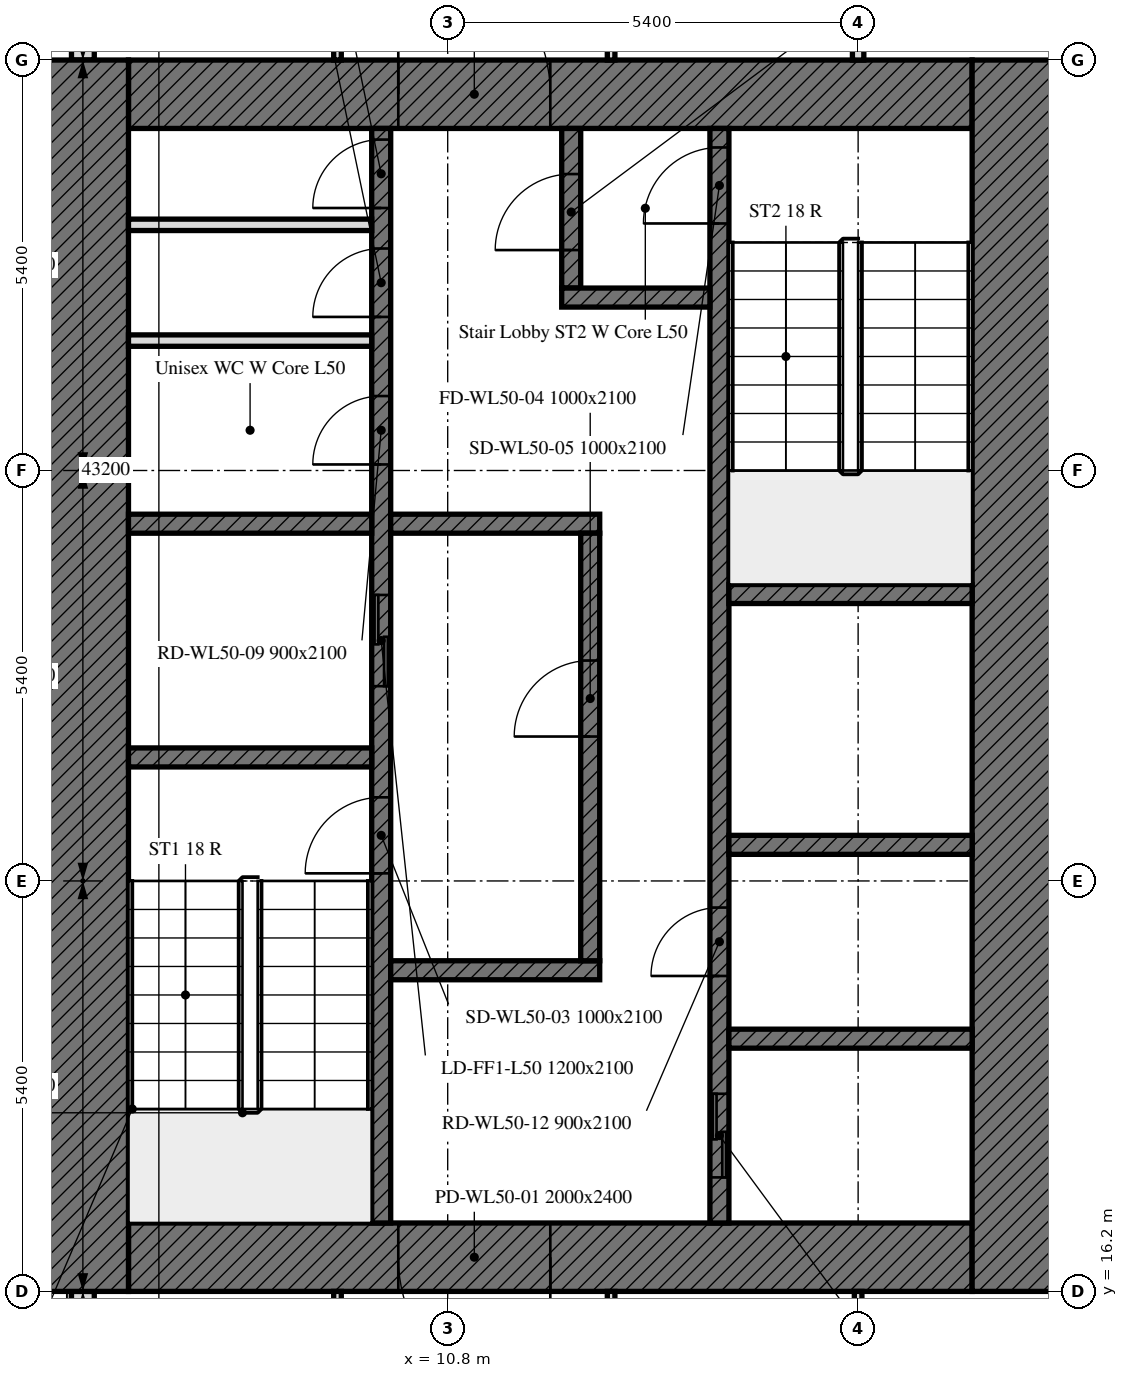
"""IFC4 building model, lengths in metres.
Left out: names, types, materials, properties, quantities, classifications, styles, units other than length and angle.
Written with IfcOpenShell. Run it as: python <this file> out.ifc"""

import sys

from ifc_helpers import new_model, si_unit, direction, frame, frame_2d, origin, place, context, subcontext, project, spatial, rectangle, extrude, element, fill, save


model = new_model("IFC4")
c1 = context("Model", 3, precision=1e-05, world=origin(), true_north=direction((0.0, 1.0)))
c2 = subcontext(c1, "Body", "Model", "MODEL_VIEW")
j1 = project(units=[si_unit("LENGTHUNIT", "METRE"), si_unit("PLANEANGLEUNIT", "RADIAN")], contexts=[c1])
p1 = place(None, origin())
s1 = spatial("IfcSite", under=j1, at=p1, CompositionType="ELEMENT")
p2 = place(p1, origin())
s2 = spatial("IfcBuilding", under=s1, at=p2, CompositionType="ELEMENT")
p3 = place(p2, frame((0.0, 0.0, 203.8)))
s3 = spatial("IfcBuildingStorey", under=s2, at=p3, CompositionType="ELEMENT", Elevation=203.8)
p4 = place(p3, frame((6.0, 43.014, 0.0), z_axis=(0.0, 0.0, 1.0), x_axis=(0.0, -1.0, 0.0)))
e1 = element("IfcWall", 1, at=p4, inside=s3, PredefinedType="SOLIDWALL", context=c2, shape_type="SweptSolid", body=[
    extrude(rectangle(XDim=10.614, YDim=0.3, at=frame_2d((5.307, 0.0))), origin(), (0.0, 0.0, 1.0), 3.0),
])
p5 = place(p4, frame((1.164, 0.0, 0.9)))
e2 = element("IfcOpeningElement", 2, at=p5, cuts=e1, PredefinedType="OPENING", context=c2, shape_type="SweptSolid", body=[
    extrude(rectangle(XDim=1.1, YDim=1.7, at=frame_2d((0.55, 0.85))), frame((0.0, 0.16, 0.0), z_axis=(0.0, -1.0, 0.0), x_axis=(1.0, 0.0, 0.0)), (0.0, 0.0, 1.0), 0.32),
])
p6 = place(p4, frame((2.764, 0.0, 0.9)))
e3 = element("IfcOpeningElement", 3, at=p6, cuts=e1, PredefinedType="OPENING", context=c2, shape_type="SweptSolid", body=[
    extrude(rectangle(XDim=1.1, YDim=1.7, at=frame_2d((0.55, 0.85))), frame((0.0, 0.16, 0.0), z_axis=(0.0, -1.0, 0.0), x_axis=(1.0, 0.0, 0.0)), (0.0, 0.0, 1.0), 0.32),
])
p7 = place(p4, frame((6.214, 0.0, 0.9)))
e4 = element("IfcOpeningElement", 4, at=p7, cuts=e1, PredefinedType="OPENING", context=c2, shape_type="SweptSolid", body=[
    extrude(rectangle(XDim=3.4, YDim=1.7, at=frame_2d((1.7, 0.85))), frame((0.0, 0.16, 0.0), z_axis=(0.0, -1.0, 0.0), x_axis=(1.0, 0.0, 0.0)), (0.0, 0.0, 1.0), 0.32),
])
p8 = place(p3, frame((6.0, 16.2, 0.0), z_axis=(0.0, 0.0, 1.0), x_axis=(0.0, -1.0, 0.0)))
e5 = element("IfcWall", 5, at=p8, inside=s3, PredefinedType="SOLIDWALL", context=c2, shape_type="SweptSolid", body=[
    extrude(rectangle(XDim=5.214, YDim=0.3, at=frame_2d((2.607, 0.0))), origin(), (0.0, 0.0, 1.0), 3.0),
])
p9 = place(p8, frame((1.35, 0.0, 0.9)))
e6 = element("IfcOpeningElement", 6, at=p9, cuts=e5, PredefinedType="OPENING", context=c2, shape_type="SweptSolid", body=[
    extrude(rectangle(XDim=1.1, YDim=1.7, at=frame_2d((0.55, 0.85))), frame((0.0, 0.16, 0.0), z_axis=(0.0, -1.0, 0.0), x_axis=(1.0, 0.0, 0.0)), (0.0, 0.0, 1.0), 0.32),
])
p10 = place(p8, frame((2.95, 0.0, 0.9)))
e7 = element("IfcOpeningElement", 7, at=p10, cuts=e5, PredefinedType="OPENING", context=c2, shape_type="SweptSolid", body=[
    extrude(rectangle(XDim=1.1, YDim=1.7, at=frame_2d((0.55, 0.85))), frame((0.0, 0.16, 0.0), z_axis=(0.0, -1.0, 0.0), x_axis=(1.0, 0.0, 0.0)), (0.0, 0.0, 1.0), 0.32),
])
p11 = place(p3, frame((17.7, 16.65, 0.0), z_axis=(0.0, 0.0, 1.0), x_axis=(-1.0, 0.0, 0.0)))
e8 = element("IfcWall", 8, at=p11, inside=s3, PredefinedType="SOLIDWALL", context=c2, shape_type="SweptSolid", body=[
    extrude(rectangle(XDim=11.1, YDim=0.9, at=frame_2d((5.55, 0.0))), origin(), (0.0, 0.0, 1.0), 3.0),
])
p12 = place(p11, frame((5.55, 0.0, 0.0)))
e9 = element("IfcOpeningElement", 9, at=p12, cuts=e8, PredefinedType="OPENING", context=c2, shape_type="SweptSolid", body=[
    extrude(rectangle(XDim=2.0, YDim=2.4, at=frame_2d((1.0, 1.2))), frame((0.0, 0.45, 0.0), z_axis=(0.0, -1.0, 0.0), x_axis=(1.0, 0.0, 0.0)), (0.0, 0.0, 1.0), 0.9),
])
p13 = place(p3, frame((6.6, 31.95, 0.0), z_axis=(0.0, 0.0, 1.0), x_axis=(1.0, 0.0, 0.0)))
e10 = element("IfcWall", 10, at=p13, inside=s3, PredefinedType="SOLIDWALL", context=c2, shape_type="SweptSolid", body=[
    extrude(rectangle(XDim=11.1, YDim=0.9, at=frame_2d((5.55, 0.0))), origin(), (0.0, 0.0, 1.0), 3.0),
])
p14 = place(p13, frame((3.55, 0.0, 0.0)))
e11 = element("IfcOpeningElement", 11, at=p14, cuts=e10, PredefinedType="OPENING", context=c2, shape_type="SweptSolid", body=[
    extrude(rectangle(XDim=2.0, YDim=2.4, at=frame_2d((1.0, 1.2))), frame((0.0, 0.45, 0.0), z_axis=(0.0, -1.0, 0.0), x_axis=(1.0, 0.0, 0.0)), (0.0, 0.0, 1.0), 0.9),
])
for number, where, z_axis, x_axis in (
    (12, (6.0, 16.2, 0.0), (0.0, 0.0, 1.0), (0.0, 1.0, 0.0)),
    (13, (18.3, 32.4, 0.0), (0.0, 0.0, 1.0), (0.0, -1.0, 0.0)),
):
    element("IfcWall", number, at=place(p3, frame(where, z_axis=z_axis, x_axis=x_axis)), inside=s3, PredefinedType="SOLIDWALL", context=c2, shape_type="SweptSolid", body=[
        extrude(rectangle(XDim=16.2, YDim=1.2, at=frame_2d((8.1, 0.0))), origin(), (0.0, 0.0, 1.0), 3.0),
    ])
p15 = place(p3, frame((9.925, 17.1, 0.0), z_axis=(0.0, 0.0, 1.0), x_axis=(0.0, 1.0, 0.0)))
e14 = element("IfcWall", 14, at=p15, inside=s3, PredefinedType="SOLIDWALL", context=c2, shape_type="SweptSolid", body=[
    extrude(rectangle(XDim=14.4, YDim=0.25, at=frame_2d((7.2, 0.0))), origin(), (0.0, 0.0, 1.0), 3.0),
])
p16 = place(p15, frame((4.6, 0.0, 0.0)))
e15 = element("IfcOpeningElement", 15, at=p16, cuts=e14, PredefinedType="OPENING", context=c2, shape_type="SweptSolid", body=[
    extrude(rectangle(XDim=1.0, YDim=2.1, at=frame_2d((0.5, 1.05))), frame((0.0, 0.125, 0.0), z_axis=(0.0, -1.0, 0.0), x_axis=(1.0, 0.0, 0.0)), (0.0, 0.0, 1.0), 0.25),
])
p17 = place(p15, frame((7.062, 0.0, 0.0)))
e16 = element("IfcOpeningElement", 16, at=p17, cuts=e14, PredefinedType="OPENING", context=c2, shape_type="SweptSolid", body=[
    extrude(rectangle(XDim=1.2, YDim=2.1, at=frame_2d((0.6, 1.05))), frame((0.0, 0.125, 0.0), z_axis=(0.0, -1.0, 0.0), x_axis=(1.0, 0.0, 0.0)), (0.0, 0.0, 1.0), 0.25),
])
p18 = place(p15, frame((9.979, 0.0, 0.0)))
e17 = element("IfcOpeningElement", 17, at=p18, cuts=e14, PredefinedType="OPENING", context=c2, shape_type="SweptSolid", body=[
    extrude(rectangle(XDim=0.9, YDim=2.1, at=frame_2d((0.45, 1.05))), frame((0.0, 0.125, 0.0), z_axis=(0.0, -1.0, 0.0), x_axis=(1.0, 0.0, 0.0)), (0.0, 0.0, 1.0), 0.25),
])
p19 = place(p15, frame((11.92, 0.0, 0.0)))
e18 = element("IfcOpeningElement", 18, at=p19, cuts=e14, PredefinedType="OPENING", context=c2, shape_type="SweptSolid", body=[
    extrude(rectangle(XDim=0.9, YDim=2.1, at=frame_2d((0.45, 1.05))), frame((0.0, 0.125, 0.0), z_axis=(0.0, -1.0, 0.0), x_axis=(1.0, 0.0, 0.0)), (0.0, 0.0, 1.0), 0.25),
])
p20 = place(p15, frame((13.354, 0.0, 0.0)))
e19 = element("IfcOpeningElement", 19, at=p20, cuts=e14, PredefinedType="OPENING", context=c2, shape_type="SweptSolid", body=[
    extrude(rectangle(XDim=0.9, YDim=2.1, at=frame_2d((0.45, 1.05))), frame((0.0, 0.125, 0.0), z_axis=(0.0, -1.0, 0.0), x_axis=(1.0, 0.0, 0.0)), (0.0, 0.0, 1.0), 0.25),
])
p21 = place(p3, frame((14.375, 17.1, 0.0), z_axis=(0.0, 0.0, 1.0), x_axis=(0.0, 1.0, 0.0)))
e20 = element("IfcWall", 20, at=p21, inside=s3, PredefinedType="SOLIDWALL", context=c2, shape_type="SweptSolid", body=[
    extrude(rectangle(XDim=14.4, YDim=0.25, at=frame_2d((7.2, 0.0))), origin(), (0.0, 0.0, 1.0), 3.0),
])
p22 = place(p21, frame((13.15, 0.0, 0.0)))
e21 = element("IfcOpeningElement", 21, at=p22, cuts=e20, PredefinedType="OPENING", context=c2, shape_type="SweptSolid", body=[
    extrude(rectangle(XDim=1.0, YDim=2.1, at=frame_2d((0.5, 1.05))), frame((0.0, 0.125, 0.0), z_axis=(0.0, -1.0, 0.0), x_axis=(1.0, 0.0, 0.0)), (0.0, 0.0, 1.0), 0.25),
])
p23 = place(p21, frame((0.6, 0.0, 0.0)))
e22 = element("IfcOpeningElement", 22, at=p23, cuts=e20, PredefinedType="OPENING", context=c2, shape_type="SweptSolid", body=[
    extrude(rectangle(XDim=1.1, YDim=2.1, at=frame_2d((0.55, 1.05))), frame((0.0, 0.125, 0.0), z_axis=(0.0, -1.0, 0.0), x_axis=(1.0, 0.0, 0.0)), (0.0, 0.0, 1.0), 0.25),
])
p24 = place(p21, frame((3.25, 0.0, 0.0)))
e23 = element("IfcOpeningElement", 23, at=p24, cuts=e20, PredefinedType="OPENING", context=c2, shape_type="SweptSolid", body=[
    extrude(rectangle(XDim=0.9, YDim=2.1, at=frame_2d((0.45, 1.05))), frame((0.0, 0.125, 0.0), z_axis=(0.0, -1.0, 0.0), x_axis=(1.0, 0.0, 0.0)), (0.0, 0.0, 1.0), 0.25),
])
for number, where, z_axis, x_axis in (
    (24, (6.6, 23.225, 0.0), (0.0, 0.0, 1.0), (1.0, 0.0, 0.0)),
    (25, (14.5, 25.375, 0.0), (0.0, 0.0, 1.0), (1.0, 0.0, 0.0)),
    (26, (14.5, 22.075, 0.0), (0.0, 0.0, 1.0), (1.0, 0.0, 0.0)),
    (27, (6.6, 26.3, 0.0), (0.0, 0.0, 1.0), (1.0, 0.0, 0.0)),
):
    element("IfcWall", number, at=place(p3, frame(where, z_axis=z_axis, x_axis=x_axis)), inside=s3, PredefinedType="SOLIDWALL", context=c2, shape_type="SweptSolid", body=[
        extrude(rectangle(XDim=3.2, YDim=0.25, at=frame_2d((1.6, 0.0))), origin(), (0.0, 0.0, 1.0), 3.0),
    ])
for number, where, z_axis, x_axis in (
    (28, (10.05, 26.3, 0.0), (0.0, 0.0, 1.0), (1.0, 0.0, 0.0)),
    (29, (10.05, 20.425, 0.0), (0.0, 0.0, 1.0), (1.0, 0.0, 0.0)),
):
    element("IfcWall", number, at=place(p3, frame(where, z_axis=z_axis, x_axis=x_axis)), inside=s3, PredefinedType="SOLIDWALL", context=c2, shape_type="SweptSolid", body=[
        extrude(rectangle(XDim=2.75, YDim=0.25, at=frame_2d((1.375, 0.0))), origin(), (0.0, 0.0, 1.0), 3.0),
    ])
p25 = place(p3, frame((12.425, 29.4, 0.0), z_axis=(0.0, 0.0, 1.0), x_axis=(0.0, 1.0, 0.0)))
e30 = element("IfcWall", 30, at=p25, inside=s3, PredefinedType="SOLIDWALL", context=c2, shape_type="SweptSolid", body=[
    extrude(rectangle(XDim=2.1, YDim=0.25, at=frame_2d((1.05, 0.0))), origin(), (0.0, 0.0, 1.0), 3.0),
])
p26 = place(p25, frame((0.5, 0.0, 0.0)))
e31 = element("IfcOpeningElement", 31, at=p26, cuts=e30, PredefinedType="OPENING", context=c2, shape_type="SweptSolid", body=[
    extrude(rectangle(XDim=1.0, YDim=2.1, at=frame_2d((0.5, 1.05))), frame((0.0, 0.125, 0.0), z_axis=(0.0, -1.0, 0.0), x_axis=(1.0, 0.0, 0.0)), (0.0, 0.0, 1.0), 0.25),
])
p27 = place(p3, frame((12.3, 29.275, 0.0), z_axis=(0.0, 0.0, 1.0), x_axis=(1.0, 0.0, 0.0)))
e32 = element("IfcWall", 32, at=p27, inside=s3, PredefinedType="SOLIDWALL", context=c2, shape_type="SweptSolid", body=[
    extrude(rectangle(XDim=1.95, YDim=0.25, at=frame_2d((0.975, 0.0))), origin(), (0.0, 0.0, 1.0), 3.0),
])
p28 = place(p3, frame((12.675, 20.55, 0.0), z_axis=(0.0, 0.0, 1.0), x_axis=(0.0, 1.0, 0.0)))
e33 = element("IfcWall", 33, at=p28, inside=s3, PredefinedType="SOLIDWALL", context=c2, shape_type="SweptSolid", body=[
    extrude(rectangle(XDim=5.625, YDim=0.25, at=frame_2d((2.812, 0.0))), origin(), (0.0, 0.0, 1.0), 3.0),
])
p29 = place(p28, frame((2.95, 0.0, 0.0)))
e34 = element("IfcOpeningElement", 34, at=p29, cuts=e33, PredefinedType="OPENING", context=c2, shape_type="SweptSolid", body=[
    extrude(rectangle(XDim=1.0, YDim=2.1, at=frame_2d((0.5, 1.05))), frame((0.0, 0.125, 0.0), z_axis=(0.0, -1.0, 0.0), x_axis=(1.0, 0.0, 0.0)), (0.0, 0.0, 1.0), 0.25),
])
p30 = place(p3, frame((14.5, 19.525, 0.0), z_axis=(0.0, 0.0, 1.0), x_axis=(1.0, 0.0, 0.0)))
e35 = element("IfcWall", 35, at=p30, inside=s3, PredefinedType="SOLIDWALL", context=c2, shape_type="SweptSolid", body=[
    extrude(rectangle(XDim=3.2, YDim=0.25, at=frame_2d((1.6, 0.0))), origin(), (0.0, 0.0, 1.0), 3.0),
])
for number, where, z_axis, x_axis in (
    (36, (6.6, 28.709, 0.0), (0.0, 0.0, 1.0), (1.0, 0.0, 0.0)),
    (37, (6.6, 30.232, 0.0), (0.0, 0.0, 1.0), (1.0, 0.0, 0.0)),
):
    element("IfcWall", number, at=place(p3, frame(where, z_axis=z_axis, x_axis=x_axis)), inside=s3, PredefinedType="PARTITIONING", context=c2, shape_type="SweptSolid", body=[
        extrude(rectangle(XDim=3.2, YDim=0.15, at=frame_2d((1.6, 0.0))), origin(), (0.0, 0.0, 1.0), 3.0),
    ])
p31 = place(p3, frame((16.2, 37.38, 0.0), z_axis=(0.0, 0.0, 1.0), x_axis=(0.0, -1.0, 0.0)))
e38 = element("IfcWall", 38, at=p31, inside=s3, PredefinedType="PARTITIONING", context=c2, shape_type="SweptSolid", body=[
    extrude(rectangle(XDim=4.98, YDim=0.15, at=frame_2d((2.49, 0.0))), origin(), (0.0, 0.0, 1.0), 2.4),
])
for number, where, z_axis, x_axis in (
    (39, (9.35, 40.425, 0.0), (0.0, 0.0, 1.0), (0.0, -1.0, 0.0)),
    (40, (12.95, 32.4, 0.0), (0.0, 0.0, 1.0), (0.0, 1.0, 0.0)),
):
    element("IfcWall", number, at=place(p3, frame(where, z_axis=z_axis, x_axis=x_axis)), inside=s3, PredefinedType="PARTITIONING", context=c2, shape_type="SweptSolid", body=[
        extrude(rectangle(XDim=8.025, YDim=0.1, at=frame_2d((4.013, 0.0))), origin(), (0.0, 0.0, 1.0), 2.4),
    ])
for number, where, z_axis, x_axis in (
    (41, (16.2, 16.2, 0.0), (0.0, 0.0, 1.0), (0.0, -1.0, 0.0)),
    (42, (9.35, 16.2, 0.0), (0.0, 0.0, 1.0), (0.0, -1.0, 0.0)),
    (43, (12.95, 13.575, 0.0), (0.0, 0.0, 1.0), (0.0, 1.0, 0.0)),
):
    element("IfcWall", number, at=place(p3, frame(where, z_axis=z_axis, x_axis=x_axis)), inside=s3, PredefinedType="PARTITIONING", context=c2, shape_type="SweptSolid", body=[
        extrude(rectangle(XDim=2.625, YDim=0.1, at=frame_2d((1.312, 0.0))), origin(), (0.0, 0.0, 1.0), 3.0),
    ])
p32 = place(p12, origin())
e44 = element("IfcDoor", 44, at=p32, inside=s3, OperationType="DOUBLE_DOOR_SINGLE_SWING", PredefinedType="DOOR", context=c2, shape_type="SweptSolid", body=[
    extrude(rectangle(XDim=2.0, YDim=2.4, at=frame_2d((1.0, 1.2))), frame((0.0, 0.025, 0.0), z_axis=(0.0, -1.0, 0.0), x_axis=(1.0, 0.0, 0.0)), (0.0, 0.0, 1.0), 0.05),
])
fill(e9, e44)
p33 = place(p14, origin())
e45 = element("IfcDoor", 45, at=p33, inside=s3, OperationType="DOUBLE_DOOR_SINGLE_SWING", PredefinedType="DOOR", context=c2, shape_type="SweptSolid", body=[
    extrude(rectangle(XDim=2.0, YDim=2.4, at=frame_2d((1.0, 1.2))), frame((0.0, 0.025, 0.0), z_axis=(0.0, -1.0, 0.0), x_axis=(1.0, 0.0, 0.0)), (0.0, 0.0, 1.0), 0.05),
])
fill(e11, e45)
p34 = place(p16, origin())
e46 = element("IfcDoor", 46, at=p34, inside=s3, OperationType="SINGLE_SWING_LEFT", PredefinedType="DOOR", context=c2, shape_type="SweptSolid", body=[
    extrude(rectangle(XDim=1.0, YDim=2.1, at=frame_2d((0.5, 1.05))), frame((0.0, 0.025, 0.0), z_axis=(0.0, -1.0, 0.0), x_axis=(1.0, 0.0, 0.0)), (0.0, 0.0, 1.0), 0.05),
])
fill(e15, e46)
p35 = place(p29, origin())
e47 = element("IfcDoor", 47, at=p35, inside=s3, OperationType="SINGLE_SWING_LEFT", PredefinedType="DOOR", context=c2, shape_type="SweptSolid", body=[
    extrude(rectangle(XDim=1.0, YDim=2.1, at=frame_2d((0.5, 1.05))), frame((0.0, 0.025, 0.0), z_axis=(0.0, -1.0, 0.0), x_axis=(1.0, 0.0, 0.0)), (0.0, 0.0, 1.0), 0.05),
])
fill(e34, e47)
p36 = place(p22, origin())
e48 = element("IfcDoor", 48, at=p36, inside=s3, OperationType="SINGLE_SWING_LEFT", PredefinedType="DOOR", context=c2, shape_type="SweptSolid", body=[
    extrude(rectangle(XDim=1.0, YDim=2.1, at=frame_2d((0.5, 1.05))), frame((0.0, 0.025, 0.0), z_axis=(0.0, -1.0, 0.0), x_axis=(1.0, 0.0, 0.0)), (0.0, 0.0, 1.0), 0.05),
])
fill(e21, e48)
p37 = place(p26, origin())
e49 = element("IfcDoor", 49, at=p37, inside=s3, OperationType="SINGLE_SWING_LEFT", PredefinedType="DOOR", context=c2, shape_type="SweptSolid", body=[
    extrude(rectangle(XDim=1.0, YDim=2.1, at=frame_2d((0.5, 1.05))), frame((0.0, 0.025, 0.0), z_axis=(0.0, -1.0, 0.0), x_axis=(1.0, 0.0, 0.0)), (0.0, 0.0, 1.0), 0.05),
])
fill(e31, e49)
p38 = place(p17, origin())
e50 = element("IfcDoor", 50, at=p38, inside=s3, OperationType="DOUBLE_DOOR_SLIDING", PredefinedType="DOOR", context=c2, shape_type="SweptSolid", body=[
    extrude(rectangle(XDim=1.2, YDim=2.1, at=frame_2d((0.6, 1.05))), frame((0.0, 0.025, 0.0), z_axis=(0.0, -1.0, 0.0), x_axis=(1.0, 0.0, 0.0)), (0.0, 0.0, 1.0), 0.05),
])
fill(e16, e50)
p39 = place(p23, origin())
e51 = element("IfcDoor", 51, at=p39, inside=s3, OperationType="DOUBLE_DOOR_SLIDING", PredefinedType="DOOR", context=c2, shape_type="SweptSolid", body=[
    extrude(rectangle(XDim=1.1, YDim=2.1, at=frame_2d((0.55, 1.05))), frame((0.0, 0.025, 0.0), z_axis=(0.0, -1.0, 0.0), x_axis=(1.0, 0.0, 0.0)), (0.0, 0.0, 1.0), 0.05),
])
fill(e22, e51)
p40 = place(p18, origin())
e52 = element("IfcDoor", 52, at=p40, inside=s3, OperationType="SINGLE_SWING_LEFT", PredefinedType="DOOR", context=c2, shape_type="SweptSolid", body=[
    extrude(rectangle(XDim=0.9, YDim=2.1, at=frame_2d((0.45, 1.05))), frame((0.0, 0.025, 0.0), z_axis=(0.0, -1.0, 0.0), x_axis=(1.0, 0.0, 0.0)), (0.0, 0.0, 1.0), 0.05),
])
fill(e17, e52)
p41 = place(p19, origin())
e53 = element("IfcDoor", 53, at=p41, inside=s3, OperationType="SINGLE_SWING_LEFT", PredefinedType="DOOR", context=c2, shape_type="SweptSolid", body=[
    extrude(rectangle(XDim=0.9, YDim=2.1, at=frame_2d((0.45, 1.05))), frame((0.0, 0.025, 0.0), z_axis=(0.0, -1.0, 0.0), x_axis=(1.0, 0.0, 0.0)), (0.0, 0.0, 1.0), 0.05),
])
fill(e18, e53)
p42 = place(p20, origin())
e54 = element("IfcDoor", 54, at=p42, inside=s3, OperationType="SINGLE_SWING_LEFT", PredefinedType="DOOR", context=c2, shape_type="SweptSolid", body=[
    extrude(rectangle(XDim=0.9, YDim=2.1, at=frame_2d((0.45, 1.05))), frame((0.0, 0.025, 0.0), z_axis=(0.0, -1.0, 0.0), x_axis=(1.0, 0.0, 0.0)), (0.0, 0.0, 1.0), 0.05),
])
fill(e19, e54)
p43 = place(p24, origin())
e55 = element("IfcDoor", 55, at=p43, inside=s3, OperationType="SINGLE_SWING_LEFT", PredefinedType="DOOR", context=c2, shape_type="SweptSolid", body=[
    extrude(rectangle(XDim=0.9, YDim=2.1, at=frame_2d((0.45, 1.05))), frame((0.0, 0.025, 0.0), z_axis=(0.0, -1.0, 0.0), x_axis=(1.0, 0.0, 0.0)), (0.0, 0.0, 1.0), 0.05),
])
fill(e23, e55)
save(model, sys.argv[1])
